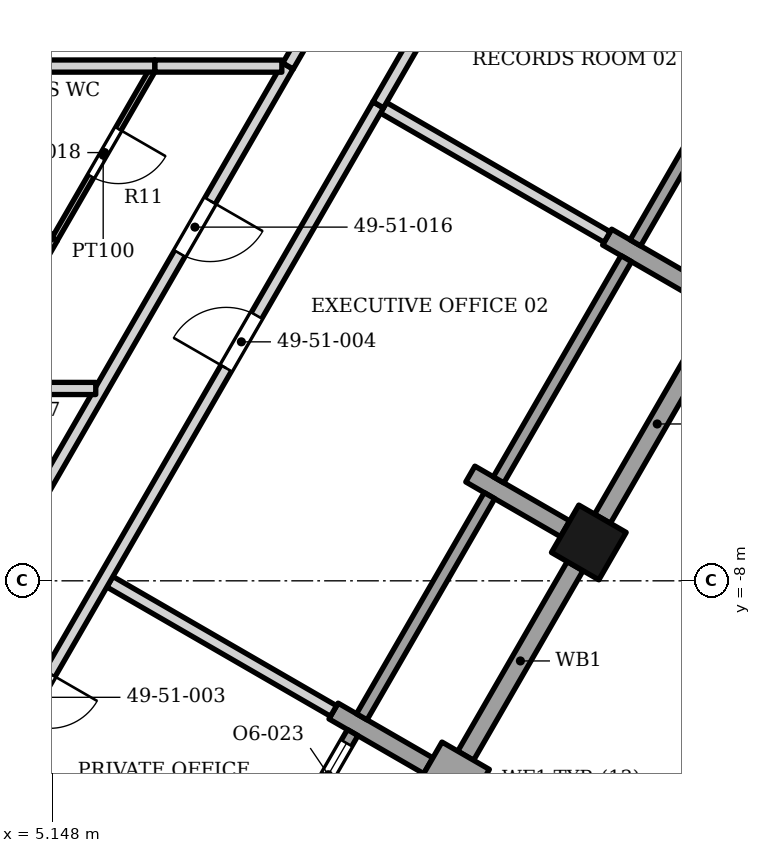
"""IFC4 building model, lengths in metres.
Left out: names, types, materials, properties, quantities, classifications, styles, units other than length and angle.
Written with IfcOpenShell. Run it as: python <this file> out.ifc"""

import sys

from ifc_helpers import new_model, si_unit, direction, frame, frame_2d, origin, origin_2d, place, context, subcontext, project, spatial, rectangle, extrude, element, fill, save


model = new_model("IFC4")
c1 = context("Model", 3, precision=1e-05, world=origin(), true_north=direction((0.0, 1.0)))
c2 = subcontext(c1, "Body", "Model", "MODEL_VIEW")
j1 = project(units=[si_unit("LENGTHUNIT", "METRE"), si_unit("PLANEANGLEUNIT", "RADIAN")], contexts=[c1])
p1 = place(None, origin())
s1 = spatial("IfcSite", under=j1, at=p1, CompositionType="ELEMENT")
p2 = place(p1, origin())
s2 = spatial("IfcBuilding", under=s1, at=p2, CompositionType="ELEMENT")
p3 = place(p2, frame((0.0, 0.0, 208.1)))
s3 = spatial("IfcBuildingStorey", under=s2, at=p3, CompositionType="ELEMENT", Elevation=208.1)
p4 = place(p3, frame((13.973, -7.369, 0.0), z_axis=(0.0, 0.0, 1.0), x_axis=(0.5, 0.866025403784, 0.0)))
e1 = element("IfcColumn", 1, at=p4, inside=s3, PredefinedType="COLUMN", context=c2, shape_type="SweptSolid", body=[
    extrude(rectangle(XDim=0.9, YDim=0.9, at=origin_2d()), origin(), (0.0, 0.0, 1.0), 3.9),
])
p5 = place(p3, frame((11.498, -11.656, 0.0), z_axis=(0.0, 0.0, 1.0), x_axis=(0.50001992892, 0.866013897511, 0.0)))
e2 = element("IfcWall", 2, at=p5, inside=s3, PredefinedType="SOLIDWALL", context=c2, shape_type="SweptSolid", body=[
    extrude(rectangle(XDim=0.9, YDim=0.9, at=frame_2d((0.45, 0.0))), origin(), (0.0, 0.0, 1.0), 3.0),
])
for number, where, z_axis, x_axis in (
    (3, (11.333, -11.041, 0.0), (0.0, 0.0, 1.0), (-0.866, 0.5, 0.0)),
    (4, (12.024, -6.244, 0.0), (0.0, 0.0, 1.0), (0.866, -0.5, 0.0)),
    (5, (15.833, -3.247, 0.0), (0.0, 0.0, 1.0), (-0.866, 0.5, 0.0)),
):
    element("IfcWall", number, at=place(p3, frame(where, z_axis=z_axis, x_axis=x_axis)), inside=s3, PredefinedType="SOLIDWALL", context=c2, shape_type="SweptSolid", body=[
        extrude(rectangle(XDim=1.8, YDim=0.3, at=frame_2d((0.9, 0.0))), origin(), (0.0, 0.0, 1.0), 3.0),
    ])
p6 = place(p3, frame((7.989, -14.133, 0.0), z_axis=(0.0, 0.0, 1.0), x_axis=(0.500027713859, 0.866009402589, 0.0)))
e6 = element("IfcWall", 6, at=p6, inside=s3, PredefinedType="ELEMENTEDWALL", context=c2, shape_type="SweptSolid", body=[
    extrude(rectangle(XDim=4.2, YDim=0.2, at=frame_2d((2.1, 0.0))), origin(), (0.0, 0.0, 1.0), 2.95),
])
p7 = place(p6, frame((0.2, 0.0, 0.45)))
e7 = element("IfcOpeningElement", 7, at=p7, cuts=e6, PredefinedType="OPENING", context=c2, shape_type="SweptSolid", body=[
    extrude(rectangle(XDim=2.4, YDim=2.25, at=frame_2d((1.2, 1.125))), frame((0.0, 0.11, 0.0), z_axis=(0.0, -1.0, 0.0), x_axis=(1.0, 0.0, 0.0)), (0.0, 0.0, 1.0), 0.22),
])
p8 = place(p6, frame((2.8, 0.0, 0.0)))
e8 = element("IfcOpeningElement", 8, at=p8, cuts=e6, PredefinedType="OPENING", context=c2, shape_type="SweptSolid", body=[
    extrude(rectangle(XDim=1.2, YDim=2.7, at=frame_2d((0.6, 1.35))), frame((0.0, 0.11, 0.0), z_axis=(0.0, -1.0, 0.0), x_axis=(1.0, 0.0, 0.0)), (0.0, 0.0, 1.0), 0.22),
])
p9 = place(p3, frame((11.948, -10.876, 0.0), z_axis=(0.0, 0.0, 1.0), x_axis=(0.500012057535, 0.866018442252, 0.0)))
e9 = element("IfcWall", 9, at=p9, inside=s3, PredefinedType="SOLIDWALL", context=c2, shape_type="SweptSolid", body=[
    extrude(rectangle(XDim=3.6, YDim=0.3, at=frame_2d((1.8, 0.0))), origin(), (0.0, 0.0, 1.0), 3.0),
])
p10 = place(p3, frame((10.239, -10.236, 0.0), z_axis=(0.0, 0.0, 1.0), x_axis=(0.500002543286, 0.866023935413, 0.0)))
e10 = element("IfcWall", 10, at=p10, inside=s3, PredefinedType="ELEMENTEDWALL", context=c2, shape_type="SweptSolid", body=[
    extrude(rectangle(XDim=4.2, YDim=0.2, at=frame_2d((2.1, 0.0))), origin(), (0.0, 0.0, 1.0), 3.0),
])
p11 = place(p3, frame((14.198, -6.979, 0.0), z_axis=(0.0, 0.0, 1.0), x_axis=(0.500012057535, 0.866018442252, 0.0)))
e11 = element("IfcWall", 11, at=p11, inside=s3, PredefinedType="SOLIDWALL", context=c2, shape_type="SweptSolid", body=[
    extrude(rectangle(XDim=3.6, YDim=0.3, at=frame_2d((1.8, 0.0))), origin(), (0.0, 0.0, 1.0), 3.0),
])
for number, where, z_axis, x_axis in (
    (12, (12.489, -6.339, 0.0), (0.0, 0.0, 1.0), (0.5, 0.866, 0.0)),
    (13, (14.739, -2.442, 0.0), (0.0, 0.0, 1.0), (0.5, 0.866, 0.0)),
):
    element("IfcWall", number, at=place(p3, frame(where, z_axis=z_axis, x_axis=x_axis)), inside=s3, PredefinedType="ELEMENTEDWALL", context=c2, shape_type="SweptSolid", body=[
        extrude(rectangle(XDim=4.2, YDim=0.2, at=frame_2d((2.1, 0.0))), origin(), (0.0, 0.0, 1.0), 3.0),
    ])
p12 = place(p3, frame((2.469, -10.893, 0.0), z_axis=(0.0, 0.0, 1.0), x_axis=(0.499769731946, 0.866158308296, 0.0)))
e14 = element("IfcWall", 14, at=p12, inside=s3, PredefinedType="PARTITIONING", context=c2, shape_type="SweptSolid", body=[
    extrude(rectangle(XDim=13.113, YDim=0.2, at=frame_2d((6.557, 0.0))), origin(), (0.0, 0.0, 1.0), 2.884),
])
p13 = place(p12, frame((3.048, 0.0, 0.0)))
e15 = element("IfcOpeningElement", 15, at=p13, cuts=e14, PredefinedType="OPENING", context=c2, shape_type="SweptSolid", body=[
    extrude(rectangle(XDim=0.9, YDim=2.1, at=frame_2d((0.45, 1.05))), frame((0.0, 0.11, 0.0), z_axis=(0.0, -1.0, 0.0), x_axis=(1.0, 0.0, 0.0)), (0.0, 0.0, 1.0), 0.22),
])
p14 = place(p12, frame((9.556, 0.0, 0.0)))
e16 = element("IfcOpeningElement", 16, at=p14, cuts=e14, PredefinedType="OPENING", context=c2, shape_type="SweptSolid", body=[
    extrude(rectangle(XDim=1.0, YDim=2.1, at=frame_2d((0.5, 1.05))), frame((0.0, 0.11, 0.0), z_axis=(0.0, -1.0, 0.0), x_axis=(1.0, 0.0, 0.0)), (0.0, 0.0, 1.0), 0.22),
])
p15 = place(p3, frame((6.094, -8.014, 0.0), z_axis=(0.0, 0.0, 1.0), x_axis=(0.865797051121, -0.50039531, 0.0)))
e17 = element("IfcWall", 17, at=p15, inside=s3, PredefinedType="PARTITIONING", context=c2, shape_type="SweptSolid", body=[
    extrude(rectangle(XDim=4.25, YDim=0.2, at=frame_2d((2.125, 0.0))), origin(), (0.0, 0.0, 1.0), 3.052),
])
p16 = place(p3, frame((3.771, -4.835, 0.0), z_axis=(0.0, 0.0, 1.0), x_axis=(0.999999666495, -0.00081670723, 0.0)))
e18 = element("IfcWall", 18, at=p16, inside=s3, PredefinedType="PARTITIONING", context=c2, shape_type="SweptSolid", body=[
    extrude(rectangle(XDim=2.093, YDim=0.2, at=frame_2d((1.046, 0.0))), origin(), (0.0, 0.0, 1.0), 3.73),
])
p17 = place(p3, frame((3.821, -4.748, 0.0), z_axis=(0.0, 0.0, 1.0), x_axis=(0.500518638442, 0.865725760603, 0.0)))
e19 = element("IfcWall", 19, at=p17, inside=s3, PredefinedType="PARTITIONING", context=c2, shape_type="SweptSolid", body=[
    extrude(rectangle(XDim=2.733, YDim=0.1, at=frame_2d((1.367, 0.0))), origin(), (0.0, 0.0, 1.0), 2.884),
])
p18 = place(p17, frame((0.867, 0.0, 0.0)))
e20 = element("IfcOpeningElement", 20, at=p18, cuts=e19, PredefinedType="OPENING", context=c2, shape_type="SweptSolid", body=[
    extrude(rectangle(XDim=0.9, YDim=2.1, at=frame_2d((0.45, 1.05))), frame((0.0, 0.06, 0.0), z_axis=(0.0, -1.0, 0.0), x_axis=(1.0, 0.0, 0.0)), (0.0, 0.0, 1.0), 0.12),
])
p19 = place(p3, frame((5.189, -2.379, 0.0), z_axis=(0.0, 0.0, 1.0), x_axis=(0.500398861512, 0.865794998482, 0.0)))
e21 = element("IfcWall", 21, at=p19, inside=s3, PredefinedType="PARTITIONING", context=c2, shape_type="SweptSolid", body=[
    extrude(rectangle(XDim=3.187, YDim=0.1, at=frame_2d((1.593, 0.0))), origin(), (0.0, 0.0, 1.0), 3.73),
])
p20 = place(p19, frame((1.192, 0.0, 0.0)))
e22 = element("IfcOpeningElement", 22, at=p20, cuts=e21, PredefinedType="OPENING", context=c2, shape_type="SweptSolid", body=[
    extrude(rectangle(XDim=0.9, YDim=2.1, at=frame_2d((0.45, 1.05))), frame((0.0, 0.06, 0.0), z_axis=(0.0, -1.0, 0.0), x_axis=(1.0, 0.0, 0.0)), (0.0, 0.0, 1.0), 0.12),
])
p21 = place(p3, frame((2.552, -0.858, 0.0), z_axis=(0.0, 0.0, 1.0), x_axis=(0.866076950936, -0.499910707084, 0.0)))
e23 = element("IfcWall", 23, at=p21, inside=s3, PredefinedType="PARTITIONING", context=c2, shape_type="SweptSolid", body=[
    extrude(rectangle(XDim=2.994, YDim=0.1, at=frame_2d((1.497, 0.0))), origin(), (0.0, 0.0, 1.0), 2.884),
])
p22 = place(p3, frame((10.596, -0.221, 0.0), z_axis=(0.0, 0.0, 1.0), x_axis=(0.86582081126, -0.500354197333, 0.0)))
e24 = element("IfcWall", 24, at=p22, inside=s3, PredefinedType="PARTITIONING", context=c2, shape_type="SweptSolid", body=[
    extrude(rectangle(XDim=4.248, YDim=0.2, at=frame_2d((2.124, 0.0))), origin(), (0.0, 0.0, 1.0), 3.052),
])
p23 = place(p3, frame((3.759, -11.864, 0.0), z_axis=(0.0, 0.0, 1.0), x_axis=(0.499997969693, 0.866026575979, 0.0)))
e25 = element("IfcWall", 25, at=p23, inside=s3, PredefinedType="PARTITIONING", context=c2, shape_type="SweptSolid", body=[
    extrude(rectangle(XDim=13.5, YDim=0.2, at=frame_2d((6.75, 0.0))), origin(), (0.0, 0.0, 1.0), 2.884),
])
p24 = place(p23, frame((1.8, 0.0, 0.0)))
e26 = element("IfcOpeningElement", 26, at=p24, cuts=e25, PredefinedType="OPENING", context=c2, shape_type="SweptSolid", body=[
    extrude(rectangle(XDim=0.9, YDim=2.1, at=frame_2d((0.45, 1.05))), frame((0.0, 0.11, 0.0), z_axis=(0.0, -1.0, 0.0), x_axis=(1.0, 0.0, 0.0)), (0.0, 0.0, 1.0), 0.22),
])
p25 = place(p23, frame((8.5, 0.0, 0.0)))
e27 = element("IfcOpeningElement", 27, at=p25, cuts=e25, PredefinedType="OPENING", context=c2, shape_type="SweptSolid", body=[
    extrude(rectangle(XDim=1.0, YDim=2.4, at=frame_2d((0.5, 1.2))), frame((0.0, 0.11, 0.0), z_axis=(0.0, -1.0, 0.0), x_axis=(1.0, 0.0, 0.0)), (0.0, 0.0, 1.0), 0.22),
])
p26 = place(p3, frame((6.833, 0.466, 0.0), z_axis=(0.0, 0.0, 1.0), x_axis=(0.999999665949, -0.000817374785, 0.0)))
e28 = element("IfcWall", 28, at=p26, inside=s3, PredefinedType="PARTITIONING", context=c2, shape_type="SweptSolid", body=[
    extrude(rectangle(XDim=2.091, YDim=0.2, at=frame_2d((1.045, 0.0))), origin(), (0.0, 0.0, 1.0), 3.73),
])
p27 = place(p3, frame((2.468, 0.464, 0.0), z_axis=(0.0, 0.0, 1.0), x_axis=(0.999999923373, 0.000391476957, 0.0)))
e29 = element("IfcWall", 29, at=p27, inside=s3, PredefinedType="PARTITIONING", context=c2, shape_type="SweptSolid", body=[
    extrude(rectangle(XDim=4.365, YDim=0.2, at=frame_2d((2.183, 0.0))), origin(), (0.0, 0.0, 1.0), 3.73),
])
p28 = place(p3, frame((9.025, 0.466, 0.0), z_axis=(0.0, 0.0, 1.0), x_axis=(0.500421935149, 0.865781662327, 0.0)))
e30 = element("IfcWall", 30, at=p28, inside=s3, PredefinedType="PARTITIONING", context=c2, shape_type="SweptSolid", body=[
    extrude(rectangle(XDim=3.635, YDim=0.2, at=frame_2d((1.817, 0.0))), origin(), (0.0, 0.0, 1.0), 3.052),
])
p29 = place(p3, frame((10.51, -0.171, 0.0), z_axis=(0.0, 0.0, 1.0), x_axis=(0.499676732976, 0.86621196166, 0.0)))
e31 = element("IfcWall", 31, at=p29, inside=s3, PredefinedType="PARTITIONING", context=c2, shape_type="SweptSolid", body=[
    extrude(rectangle(XDim=4.469, YDim=0.2, at=frame_2d((2.234, 0.0))), origin(), (0.0, 0.0, 1.0), 3.73),
])
p30 = place(p29, frame((1.783, 0.0, 0.0)))
e32 = element("IfcOpeningElement", 32, at=p30, cuts=e31, PredefinedType="OPENING", context=c2, shape_type="SweptSolid", body=[
    extrude(rectangle(XDim=0.9, YDim=2.1, at=frame_2d((0.45, 1.05))), frame((0.0, 0.11, 0.0), z_axis=(0.0, -1.0, 0.0), x_axis=(1.0, 0.0, 0.0)), (0.0, 0.0, 1.0), 0.22),
])
p31 = place(p8, origin())
e33 = element("IfcDoor", 33, at=p31, inside=s3, OperationType="SINGLE_SWING_LEFT", PredefinedType="DOOR", context=c2, shape_type="SweptSolid", body=[
    extrude(rectangle(XDim=1.2, YDim=2.7, at=frame_2d((0.6, 1.35))), frame((0.0, 0.025, 0.0), z_axis=(0.0, -1.0, 0.0), x_axis=(1.0, 0.0, 0.0)), (0.0, 0.0, 1.0), 0.05),
])
fill(e8, e33)
p32 = place(p25, origin())
e34 = element("IfcDoor", 34, at=p32, inside=s3, OperationType="SINGLE_SWING_LEFT", PredefinedType="DOOR", context=c2, shape_type="SweptSolid", body=[
    extrude(rectangle(XDim=1.0, YDim=2.4, at=frame_2d((0.5, 1.2))), frame((0.0, 0.025, 0.0), z_axis=(0.0, -1.0, 0.0), x_axis=(1.0, 0.0, 0.0)), (0.0, 0.0, 1.0), 0.05),
])
fill(e27, e34)
p33 = place(p14, origin())
e35 = element("IfcDoor", 35, at=p33, inside=s3, OperationType="SINGLE_SWING_RIGHT", PredefinedType="DOOR", context=c2, shape_type="SweptSolid", body=[
    extrude(rectangle(XDim=1.0, YDim=2.1, at=frame_2d((0.5, 1.05))), frame((0.0, 0.025, 0.0), z_axis=(0.0, -1.0, 0.0), x_axis=(1.0, 0.0, 0.0)), (0.0, 0.0, 1.0), 0.05),
])
fill(e16, e35)
p34 = place(p20, origin())
e36 = element("IfcDoor", 36, at=p34, inside=s3, OperationType="SINGLE_SWING_RIGHT", PredefinedType="DOOR", context=c2, shape_type="SweptSolid", body=[
    extrude(rectangle(XDim=0.9, YDim=2.1, at=frame_2d((0.45, 1.05))), frame((0.0, 0.025, 0.0), z_axis=(0.0, -1.0, 0.0), x_axis=(1.0, 0.0, 0.0)), (0.0, 0.0, 1.0), 0.05),
])
fill(e22, e36)
save(model, sys.argv[1])
